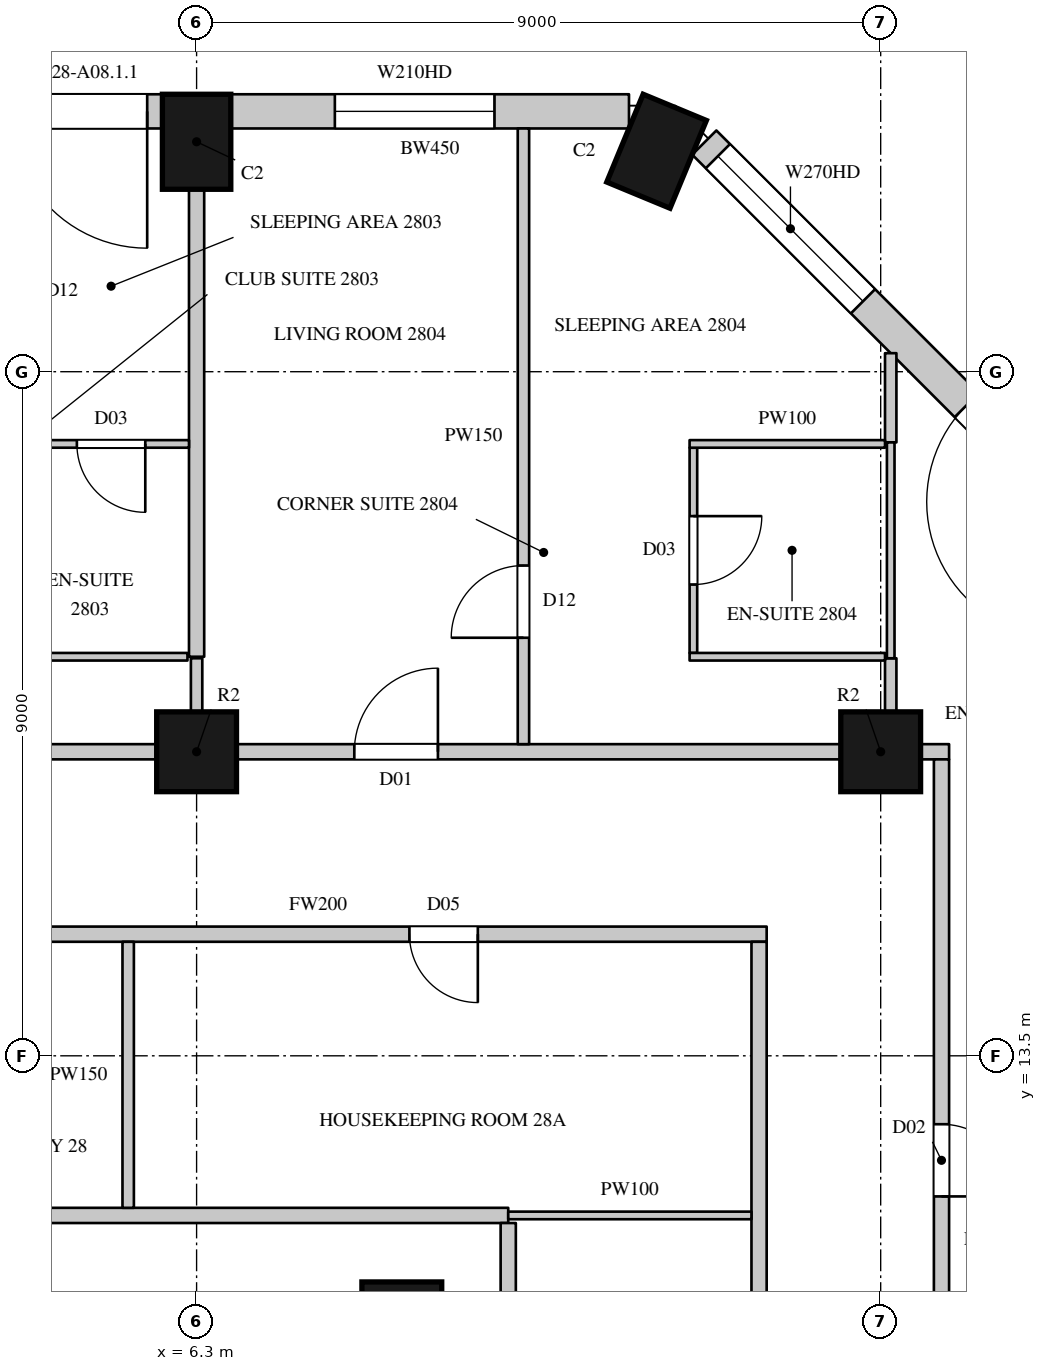
"""IFC4 building model, lengths in metres.
Left out: names, types, materials, properties, quantities, classifications, styles, units other than length and angle.
Written with IfcOpenShell. Run it as: python <this file> out.ifc"""

import sys

from ifc_helpers import new_model, si_unit, direction, frame, frame_2d, origin, origin_2d, place, context, subcontext, project, spatial, rectangle, circle, extrude, element, fill, save


model = new_model("IFC4")
c1 = context("Model", 3, precision=1e-05, world=origin(), true_north=direction((0.0, 1.0)))
c2 = subcontext(c1, "Body", "Model", "MODEL_VIEW")
j1 = project(units=[si_unit("LENGTHUNIT", "METRE"), si_unit("PLANEANGLEUNIT", "RADIAN")], contexts=[c1])
p1 = place(None, origin())
s1 = spatial("IfcSite", under=j1, at=p1, CompositionType="ELEMENT")
p2 = place(p1, origin())
s2 = spatial("IfcBuilding", under=s1, at=p2, CompositionType="ELEMENT")
p3 = place(p2, frame((0.0, 0.0, 131.1)))
s3 = spatial("IfcBuildingStorey", under=s2, at=p3, CompositionType="ELEMENT", Elevation=131.1)
for number, where, z_axis, x_axis in (
    (1, (12.352, 25.4, 0.0), (0.0, 0.0, 1.0), (-0.924, 0.383, 0.0)),
    (2, (6.3, 25.525, 0.0), (0.0, 0.0, 1.0), (-1.0, 0.0, 0.0)),
):
    element("IfcColumn", number, at=place(p3, frame(where, z_axis=z_axis, x_axis=x_axis)), inside=s3, PredefinedType="COLUMN", context=c2, shape_type="SweptSolid", body=[
        extrude(rectangle(XDim=0.9, YDim=1.25, at=origin_2d()), origin(), (0.0, 0.0, 1.0), 3.6),
    ])
for number, where, z_axis, x_axis in (
    (3, (6.3, 17.5, 0.0), (0.0, 0.0, 1.0), (1.0, 0.0, 0.0)),
    (4, (15.3, 17.5, 0.0), (0.0, 0.0, 1.0), (1.0, 0.0, 0.0)),
    (5, (9.0, 10.0, 0.0), (0.0, 0.0, 1.0), (1.0, 0.0, 0.0)),
):
    element("IfcColumn", number, at=place(p3, frame(where, z_axis=z_axis, x_axis=x_axis)), inside=s3, PredefinedType="COLUMN", context=c2, shape_type="SweptSolid", body=[
        extrude(circle(Radius=0.525, at=origin_2d()), origin(), (0.0, 0.0, 1.0), 3.6),
    ])
p4 = place(p3, frame((18.229, 20.265, 0.0), z_axis=(0.0, 0.0, 1.0), x_axis=(-0.707106781187, 0.707106781187, 0.0)))
e6 = element("IfcWall", 6, at=p4, inside=s3, PredefinedType="SOLIDWALL", context=c2, shape_type="SweptSolid", body=[
    extrude(rectangle(XDim=7.424, YDim=0.45, at=frame_2d((3.712, 0.0))), origin(), (0.0, 0.0, 1.0), 3.3),
])
p5 = place(p4, frame((0.74, 0.0, 0.0)))
e7 = element("IfcOpeningElement", 7, at=p5, cuts=e6, PredefinedType="OPENING", context=c2, shape_type="SweptSolid", body=[
    extrude(rectangle(XDim=1.8, YDim=2.4, at=frame_2d((0.9, 1.2))), frame((0.0, 0.235, 0.0), z_axis=(0.0, -1.0, 0.0), x_axis=(1.0, 0.0, 0.0)), (0.0, 0.0, 1.0), 0.47),
])
p6 = place(p4, frame((4.471, 0.0, 1.05)))
e8 = element("IfcOpeningElement", 8, at=p6, cuts=e6, PredefinedType="OPENING", context=c2, shape_type="SweptSolid", body=[
    extrude(rectangle(XDim=2.7, YDim=2.0, at=frame_2d((1.35, 1.0))), frame((0.0, 0.235, 0.0), z_axis=(0.0, -1.0, 0.0), x_axis=(1.0, 0.0, 0.0)), (0.0, 0.0, 1.0), 0.47),
])
p7 = place(p3, frame((11.989, 25.925, 0.0), z_axis=(0.0, 0.0, 1.0), x_axis=(-1.0, 0.0, 0.0)))
e9 = element("IfcWall", 9, at=p7, inside=s3, PredefinedType="SOLIDWALL", context=c2, shape_type="SweptSolid", body=[
    extrude(rectangle(XDim=5.239, YDim=0.45, at=frame_2d((2.619, 0.0))), origin(), (0.0, 0.0, 1.0), 3.3),
])
p8 = place(p7, frame((1.77, 0.0, 1.05)))
e10 = element("IfcOpeningElement", 10, at=p8, cuts=e9, PredefinedType="OPENING", context=c2, shape_type="SweptSolid", body=[
    extrude(rectangle(XDim=2.1, YDim=2.0, at=frame_2d((1.05, 1.0))), frame((0.0, 0.235, 0.0), z_axis=(0.0, -1.0, 0.0), x_axis=(1.0, 0.0, 0.0)), (0.0, 0.0, 1.0), 0.47),
])
p9 = place(p3, frame((5.85, 25.925, 0.0), z_axis=(0.0, 0.0, 1.0), x_axis=(-1.0, 0.0, 0.0)))
e11 = element("IfcWall", 11, at=p9, inside=s3, PredefinedType="SOLIDWALL", context=c2, shape_type="SweptSolid", body=[
    extrude(rectangle(XDim=8.1, YDim=0.45, at=frame_2d((4.05, 0.0))), origin(), (0.0, 0.0, 1.0), 3.3),
])
p10 = place(p9, frame((0.2, 0.0, 0.0)))
e12 = element("IfcOpeningElement", 12, at=p10, cuts=e11, PredefinedType="OPENING", context=c2, shape_type="SweptSolid", body=[
    extrude(rectangle(XDim=1.8, YDim=2.4, at=frame_2d((0.9, 1.2))), frame((0.0, 0.235, 0.0), z_axis=(0.0, -1.0, 0.0), x_axis=(1.0, 0.0, 0.0)), (0.0, 0.0, 1.0), 0.47),
])
p11 = place(p9, frame((2.2, 0.0, 1.05)))
e13 = element("IfcOpeningElement", 13, at=p11, cuts=e11, PredefinedType="OPENING", context=c2, shape_type="SweptSolid", body=[
    extrude(rectangle(XDim=1.2, YDim=2.0, at=frame_2d((0.6, 1.0))), frame((0.0, 0.235, 0.0), z_axis=(0.0, -1.0, 0.0), x_axis=(1.0, 0.0, 0.0)), (0.0, 0.0, 1.0), 0.47),
])
p12 = place(p9, frame((4.7, 0.0, 0.0)))
e14 = element("IfcOpeningElement", 14, at=p12, cuts=e11, PredefinedType="OPENING", context=c2, shape_type="SweptSolid", body=[
    extrude(rectangle(XDim=1.8, YDim=2.4, at=frame_2d((0.9, 1.2))), frame((0.0, 0.235, 0.0), z_axis=(0.0, -1.0, 0.0), x_axis=(1.0, 0.0, 0.0)), (0.0, 0.0, 1.0), 0.47),
])
p13 = place(p9, frame((6.7, 0.0, 1.05)))
e15 = element("IfcOpeningElement", 15, at=p13, cuts=e11, PredefinedType="OPENING", context=c2, shape_type="SweptSolid", body=[
    extrude(rectangle(XDim=1.2, YDim=2.0, at=frame_2d((0.6, 1.0))), frame((0.0, 0.235, 0.0), z_axis=(0.0, -1.0, 0.0), x_axis=(1.0, 0.0, 0.0)), (0.0, 0.0, 1.0), 0.47),
])
p14 = place(p3, frame((16.486, 23.529, 0.0), z_axis=(0.0, 0.0, 1.0), x_axis=(-0.707022305137, 0.707191247145, 0.0)))
e16 = element("IfcWall", 16, at=p14, inside=s3, PredefinedType="SOLIDWALL", context=c2, shape_type="SweptSolid", body=[
    extrude(rectangle(XDim=1.445, YDim=0.45, at=frame_2d((0.723, 0.0))), origin(), (0.0, 0.0, 1.0), 0.6),
])
p15 = place(p3, frame((-2.175, 17.5, 0.0), z_axis=(0.0, 0.0, 1.0), x_axis=(1.0, 0.0, 0.0)))
e17 = element("IfcWall", 17, at=p15, inside=s3, PredefinedType="PARTITIONING", context=c2, shape_type="SweptSolid", body=[
    extrude(rectangle(XDim=7.95, YDim=0.2, at=frame_2d((3.975, 0.0))), origin(), (0.0, 0.0, 1.0), 2.75),
])
p16 = place(p15, frame((4.55, 0.0, 0.0)))
e18 = element("IfcOpeningElement", 18, at=p16, cuts=e17, PredefinedType="OPENING", context=c2, shape_type="SweptSolid", body=[
    extrude(rectangle(XDim=1.1, YDim=2.4, at=frame_2d((0.55, 1.2))), frame((0.0, 0.11, 0.0), z_axis=(0.0, -1.0, 0.0), x_axis=(1.0, 0.0, 0.0)), (0.0, 0.0, 1.0), 0.22),
])
p17 = place(p3, frame((6.825, 17.5, 0.0), z_axis=(0.0, 0.0, 1.0), x_axis=(1.0, 0.0, 0.0)))
e19 = element("IfcWall", 19, at=p17, inside=s3, PredefinedType="PARTITIONING", context=c2, shape_type="SweptSolid", body=[
    extrude(rectangle(XDim=7.95, YDim=0.2, at=frame_2d((3.975, 0.0))), origin(), (0.0, 0.0, 1.0), 2.75),
])
p18 = place(p17, frame((1.55, 0.0, 0.0)))
e20 = element("IfcOpeningElement", 20, at=p18, cuts=e19, PredefinedType="OPENING", context=c2, shape_type="SweptSolid", body=[
    extrude(rectangle(XDim=1.1, YDim=2.4, at=frame_2d((0.55, 1.2))), frame((0.0, 0.11, 0.0), z_axis=(0.0, -1.0, 0.0), x_axis=(1.0, 0.0, 0.0)), (0.0, 0.0, 1.0), 0.22),
])
p19 = place(p3, frame((15.825, 17.5, 0.0), z_axis=(0.0, 0.0, 1.0), x_axis=(1.0, 0.0, 0.0)))
e21 = element("IfcWall", 21, at=p19, inside=s3, PredefinedType="PARTITIONING", context=c2, shape_type="SweptSolid", body=[
    extrude(rectangle(XDim=0.375, YDim=0.2, at=frame_2d((0.188, 0.0))), origin(), (0.0, 0.0, 1.0), 3.3),
])
p20 = place(p3, frame((-8.3, 11.4, 0.0), z_axis=(0.0, 0.0, 1.0), x_axis=(1.0, 0.0, 0.0)))
e22 = element("IfcWall", 22, at=p20, inside=s3, PredefinedType="PARTITIONING", context=c2, shape_type="SweptSolid", body=[
    extrude(rectangle(XDim=18.7, YDim=0.2, at=frame_2d((9.35, 0.0))), origin(), (0.0, 0.0, 1.0), 3.3),
])
p21 = place(p20, frame((6.9, 0.0, 0.0)))
e23 = element("IfcOpeningElement", 23, at=p21, cuts=e22, PredefinedType="OPENING", context=c2, shape_type="SweptSolid", body=[
    extrude(rectangle(XDim=1.5, YDim=2.2, at=frame_2d((0.75, 1.1))), frame((0.0, 0.11, 0.0), z_axis=(0.0, -1.0, 0.0), x_axis=(1.0, 0.0, 0.0)), (0.0, 0.0, 1.0), 0.22),
])
p22 = place(p3, frame((2.0, 15.1, 0.0), z_axis=(0.0, 0.0, 1.0), x_axis=(1.0, 0.0, 0.0)))
e24 = element("IfcWall", 24, at=p22, inside=s3, PredefinedType="PARTITIONING", context=c2, shape_type="SweptSolid", body=[
    extrude(rectangle(XDim=11.8, YDim=0.2, at=frame_2d((5.9, 0.0))), origin(), (0.0, 0.0, 1.0), 3.3),
])
p23 = place(p22, frame((7.1, 0.0, 0.0)))
e25 = element("IfcOpeningElement", 25, at=p23, cuts=e24, PredefinedType="OPENING", context=c2, shape_type="SweptSolid", body=[
    extrude(rectangle(XDim=0.9, YDim=2.2, at=frame_2d((0.45, 1.1))), frame((0.0, 0.11, 0.0), z_axis=(0.0, -1.0, 0.0), x_axis=(1.0, 0.0, 0.0)), (0.0, 0.0, 1.0), 0.22),
])
p24 = place(p3, frame((10.4, -11.3, 0.0), z_axis=(0.0, 0.0, 1.0), x_axis=(0.0, 1.0, 0.0)))
e26 = element("IfcWall", 26, at=p24, inside=s3, PredefinedType="PARTITIONING", context=c2, shape_type="SweptSolid", body=[
    extrude(rectangle(XDim=22.6, YDim=0.2, at=frame_2d((11.3, 0.0))), origin(), (0.0, 0.0, 1.0), 3.3),
])
p25 = place(p24, frame((16.3, 0.0, 0.0)))
e27 = element("IfcOpeningElement", 27, at=p25, cuts=e26, PredefinedType="OPENING", context=c2, shape_type="SweptSolid", body=[
    extrude(rectangle(XDim=1.5, YDim=2.2, at=frame_2d((0.75, 1.1))), frame((0.0, 0.11, 0.0), z_axis=(0.0, -1.0, 0.0), x_axis=(1.0, 0.0, 0.0)), (0.0, 0.0, 1.0), 0.22),
])
p26 = place(p24, frame((9.15, 0.0, 0.0)))
e28 = element("IfcOpeningElement", 28, at=p26, cuts=e26, PredefinedType="OPENING", context=c2, shape_type="SweptSolid", body=[
    extrude(rectangle(XDim=1.5, YDim=2.2, at=frame_2d((0.75, 1.1))), frame((0.0, 0.11, 0.0), z_axis=(0.0, -1.0, 0.0), x_axis=(1.0, 0.0, 0.0)), (0.0, 0.0, 1.0), 0.22),
])
p27 = place(p3, frame((13.7, 6.825, 0.0), z_axis=(0.0, 0.0, 1.0), x_axis=(0.0, 1.0, 0.0)))
e29 = element("IfcWall", 29, at=p27, inside=s3, PredefinedType="PARTITIONING", context=c2, shape_type="SweptSolid", body=[
    extrude(rectangle(XDim=8.175, YDim=0.2, at=frame_2d((4.087, 0.0))), origin(), (0.0, 0.0, 1.0), 3.3),
])
p28 = place(p3, frame((16.1, 4.75, 0.0), z_axis=(0.0, 0.0, 1.0), x_axis=(0.0, 1.0, 0.0)))
e30 = element("IfcWall", 30, at=p28, inside=s3, PredefinedType="PARTITIONING", context=c2, shape_type="SweptSolid", body=[
    extrude(rectangle(XDim=12.65, YDim=0.2, at=frame_2d((6.325, 0.0))), origin(), (0.0, 0.0, 1.0), 3.3),
])
p29 = place(p28, frame((0.5, 0.0, 0.0)))
e31 = element("IfcOpeningElement", 31, at=p29, cuts=e30, PredefinedType="OPENING", context=c2, shape_type="SweptSolid", body=[
    extrude(rectangle(XDim=0.95, YDim=2.2, at=frame_2d((0.475, 1.1))), frame((0.0, 0.11, 0.0), z_axis=(0.0, -1.0, 0.0), x_axis=(1.0, 0.0, 0.0)), (0.0, 0.0, 1.0), 0.22),
])
p30 = place(p28, frame((6.9, 0.0, 0.0)))
e32 = element("IfcOpeningElement", 32, at=p30, cuts=e30, PredefinedType="OPENING", context=c2, shape_type="SweptSolid", body=[
    extrude(rectangle(XDim=0.95, YDim=2.2, at=frame_2d((0.475, 1.1))), frame((0.0, 0.11, 0.0), z_axis=(0.0, -1.0, 0.0), x_axis=(1.0, 0.0, 0.0)), (0.0, 0.0, 1.0), 0.22),
])
p31 = place(p3, frame((5.4, 11.5, 0.0), z_axis=(0.0, 0.0, 1.0), x_axis=(0.0, 1.0, 0.0)))
e33 = element("IfcWall", 33, at=p31, inside=s3, PredefinedType="PARTITIONING", context=c2, shape_type="SweptSolid", body=[
    extrude(rectangle(XDim=3.5, YDim=0.15, at=frame_2d((1.75, 0.0))), origin(), (0.0, 0.0, 1.0), 3.3),
])
p32 = place(p3, frame((6.3, 18.025, 0.0), z_axis=(0.0, 0.0, 1.0), x_axis=(0.0, 1.0, 0.0)))
e34 = element("IfcWall", 34, at=p32, inside=s3, PredefinedType="PARTITIONING", context=c2, shape_type="SweptSolid", body=[
    extrude(rectangle(XDim=0.705, YDim=0.15, at=frame_2d((0.353, 0.0))), origin(), (0.0, 0.0, 1.0), 2.75),
])
p33 = place(p3, frame((10.6, 17.6, 0.0), z_axis=(0.0, 0.0, 1.0), x_axis=(0.0, 1.0, 0.0)))
e35 = element("IfcWall", 35, at=p33, inside=s3, PredefinedType="PARTITIONING", context=c2, shape_type="SweptSolid", body=[
    extrude(rectangle(XDim=8.1, YDim=0.15, at=frame_2d((4.05, 0.0))), origin(), (0.0, 0.0, 1.0), 3.3),
])
p34 = place(p33, frame((1.4, 0.0, 0.0)))
e36 = element("IfcOpeningElement", 36, at=p34, cuts=e35, PredefinedType="OPENING", context=c2, shape_type="SweptSolid", body=[
    extrude(rectangle(XDim=0.95, YDim=2.2, at=frame_2d((0.475, 1.1))), frame((0.0, 0.085, 0.0), z_axis=(0.0, -1.0, 0.0), x_axis=(1.0, 0.0, 0.0)), (0.0, 0.0, 1.0), 0.17),
])
p35 = place(p3, frame((15.432, 18.016, 0.0), z_axis=(0.0, 0.0, 1.0), x_axis=(0.0, 1.0, 0.0)))
e37 = element("IfcWall", 37, at=p35, inside=s3, PredefinedType="PARTITIONING", context=c2, shape_type="SweptSolid", body=[
    extrude(rectangle(XDim=0.714, YDim=0.15, at=frame_2d((0.357, 0.0))), origin(), (0.0, 0.0, 1.0), 3.3),
])
p36 = place(p3, frame((15.432, 21.57, 0.0), z_axis=(0.0, 0.0, 1.0), x_axis=(0.0, 1.0, 0.0)))
e38 = element("IfcWall", 38, at=p36, inside=s3, PredefinedType="PARTITIONING", context=c2, shape_type="SweptSolid", body=[
    extrude(rectangle(XDim=1.174, YDim=0.15, at=frame_2d((0.587, 0.0))), origin(), (0.0, 0.0, 1.0), 3.3),
])
p37 = place(p3, frame((6.3, 18.75, 0.0), z_axis=(0.0, 0.0, 1.0), x_axis=(0.0, 1.0, 0.0)))
e39 = element("IfcWall", 39, at=p37, inside=s3, PredefinedType="PARTITIONING", context=c2, shape_type="SweptSolid", body=[
    extrude(rectangle(XDim=6.15, YDim=0.2, at=frame_2d((3.075, 0.0))), origin(), (0.0, 0.0, 1.0), 2.75),
])
p38 = place(p3, frame((4.125, 21.55, 0.0), z_axis=(0.0, 0.0, 1.0), x_axis=(1.0, 0.0, 0.0)))
e40 = element("IfcWall", 40, at=p38, inside=s3, PredefinedType="PARTITIONING", context=c2, shape_type="SweptSolid", body=[
    extrude(rectangle(XDim=2.075, YDim=0.1, at=frame_2d((1.038, 0.0))), origin(), (0.0, 0.0, 1.0), 3.3),
])
p39 = place(p38, frame((0.6, 0.0, 0.0)))
e41 = element("IfcOpeningElement", 41, at=p39, cuts=e40, PredefinedType="OPENING", context=c2, shape_type="SweptSolid", body=[
    extrude(rectangle(XDim=0.9, YDim=2.2, at=frame_2d((0.45, 1.1))), frame((0.0, 0.06, 0.0), z_axis=(0.0, -1.0, 0.0), x_axis=(1.0, 0.0, 0.0)), (0.0, 0.0, 1.0), 0.12),
])
p40 = place(p3, frame((4.07, 18.75, 0.0), z_axis=(0.0, 0.0, 1.0), x_axis=(1.0, 0.0, 0.0)))
e42 = element("IfcWall", 42, at=p40, inside=s3, PredefinedType="PARTITIONING", context=c2, shape_type="SweptSolid", body=[
    extrude(rectangle(XDim=2.11, YDim=0.1, at=frame_2d((1.055, 0.0))), origin(), (0.0, 0.0, 1.0), 3.3),
])
p41 = place(p3, frame((10.4, 11.4, 0.0), z_axis=(0.0, 0.0, 1.0), x_axis=(1.0, 0.0, 0.0)))
e43 = element("IfcWall", 43, at=p41, inside=s3, PredefinedType="PARTITIONING", context=c2, shape_type="SweptSolid", body=[
    extrude(rectangle(XDim=3.2, YDim=0.1, at=frame_2d((1.6, 0.0))), origin(), (0.0, 0.0, 1.0), 3.3),
])
p42 = place(p3, frame((12.836, 18.8, 0.0), z_axis=(0.0, 0.0, 1.0), x_axis=(0.0, 1.0, 0.0)))
e44 = element("IfcWall", 44, at=p42, inside=s3, PredefinedType="PARTITIONING", context=c2, shape_type="SweptSolid", body=[
    extrude(rectangle(XDim=2.7, YDim=0.1, at=frame_2d((1.35, 0.0))), origin(), (0.0, 0.0, 1.0), 3.3),
])
p43 = place(p42, frame((0.9, 0.0, 0.0)))
e45 = element("IfcOpeningElement", 45, at=p43, cuts=e44, PredefinedType="OPENING", context=c2, shape_type="SweptSolid", body=[
    extrude(rectangle(XDim=0.9, YDim=2.2, at=frame_2d((0.45, 1.1))), frame((0.0, 0.06, 0.0), z_axis=(0.0, -1.0, 0.0), x_axis=(1.0, 0.0, 0.0)), (0.0, 0.0, 1.0), 0.12),
])
for number, where, z_axis, x_axis in (
    (46, (12.786, 18.75, 0.0), (0.0, 0.0, 1.0), (1.0, 0.0, 0.0)),
    (47, (12.786, 21.55, 0.0), (0.0, 0.0, 1.0), (1.0, 0.0, 0.0)),
):
    element("IfcWall", number, at=place(p3, frame(where, z_axis=z_axis, x_axis=x_axis)), inside=s3, PredefinedType="PARTITIONING", context=c2, shape_type="SweptSolid", body=[
        extrude(rectangle(XDim=2.571, YDim=0.1, at=frame_2d((1.286, 0.0))), origin(), (0.0, 0.0, 1.0), 3.3),
    ])
p44 = place(p3, frame((15.432, 18.73, 0.0), z_axis=(0.0, 0.0, 1.0), x_axis=(0.0, 1.0, 0.0)))
e48 = element("IfcWall", 48, at=p44, inside=s3, PredefinedType="PARTITIONING", context=c2, shape_type="SweptSolid", body=[
    extrude(rectangle(XDim=2.84, YDim=0.1, at=frame_2d((1.42, 0.0))), origin(), (0.0, 0.0, 1.0), 3.3),
])
p45 = place(p5, origin())
e49 = element("IfcDoor", 49, at=p45, inside=s3, OperationType="SLIDING_TO_LEFT", PredefinedType="DOOR", context=c2, shape_type="SweptSolid", body=[
    extrude(rectangle(XDim=1.8, YDim=2.4, at=frame_2d((0.9, 1.2))), frame((0.0, 0.13, 0.0), z_axis=(0.0, -1.0, 0.0), x_axis=(1.0, 0.0, 0.0)), (0.0, 0.0, 1.0), 0.05),
])
fill(e7, e49)
p46 = place(p6, origin())
e50 = element("IfcWindow", 50, at=p46, inside=s3, PartitioningType="SINGLE_PANEL", PredefinedType="WINDOW", context=c2, shape_type="SweptSolid", body=[
    extrude(rectangle(XDim=2.7, YDim=2.0, at=frame_2d((1.35, 1.0))), frame((0.0, 0.135, 0.0), z_axis=(0.0, -1.0, 0.0), x_axis=(1.0, 0.0, 0.0)), (0.0, 0.0, 1.0), 0.06),
])
fill(e8, e50)
p47 = place(p10, origin())
e51 = element("IfcDoor", 51, at=p47, inside=s3, OperationType="SLIDING_TO_LEFT", PredefinedType="DOOR", context=c2, shape_type="SweptSolid", body=[
    extrude(rectangle(XDim=1.8, YDim=2.4, at=frame_2d((0.9, 1.2))), frame((0.0, 0.13, 0.0), z_axis=(0.0, -1.0, 0.0), x_axis=(1.0, 0.0, 0.0)), (0.0, 0.0, 1.0), 0.05),
])
fill(e12, e51)
p48 = place(p23, origin())
e52 = element("IfcDoor", 52, at=p48, inside=s3, OperationType="SINGLE_SWING_LEFT", PredefinedType="DOOR", context=c2, shape_type="SweptSolid", body=[
    extrude(rectangle(XDim=0.9, YDim=2.2, at=frame_2d((0.45, 1.1))), frame((0.0, 0.025, 0.0), z_axis=(0.0, -1.0, 0.0), x_axis=(1.0, 0.0, 0.0)), (0.0, 0.0, 1.0), 0.05),
])
fill(e25, e52)
p49 = place(p39, origin())
e53 = element("IfcDoor", 53, at=p49, inside=s3, OperationType="SINGLE_SWING_LEFT", PredefinedType="DOOR", context=c2, shape_type="SweptSolid", body=[
    extrude(rectangle(XDim=0.9, YDim=2.2, at=frame_2d((0.45, 1.1))), frame((0.0, 0.025, 0.0), z_axis=(0.0, -1.0, 0.0), x_axis=(1.0, 0.0, 0.0)), (0.0, 0.0, 1.0), 0.05),
])
fill(e41, e53)
p50 = place(p18, origin())
e54 = element("IfcDoor", 54, at=p50, inside=s3, OperationType="SINGLE_SWING_RIGHT", PredefinedType="DOOR", context=c2, shape_type="SweptSolid", body=[
    extrude(rectangle(XDim=1.1, YDim=2.4, at=frame_2d((0.55, 1.2))), frame((0.0, 0.025, 0.0), z_axis=(0.0, -1.0, 0.0), x_axis=(1.0, 0.0, 0.0)), (0.0, 0.0, 1.0), 0.05),
])
fill(e20, e54)
p51 = place(p34, origin())
e55 = element("IfcDoor", 55, at=p51, inside=s3, OperationType="SINGLE_SWING_LEFT", PredefinedType="DOOR", context=c2, shape_type="SweptSolid", body=[
    extrude(rectangle(XDim=0.95, YDim=2.2, at=frame_2d((0.475, 1.1))), frame((0.0, 0.025, 0.0), z_axis=(0.0, -1.0, 0.0), x_axis=(1.0, 0.0, 0.0)), (0.0, 0.0, 1.0), 0.05),
])
fill(e36, e55)
p52 = place(p43, origin())
e56 = element("IfcDoor", 56, at=p52, inside=s3, OperationType="SINGLE_SWING_LEFT", PredefinedType="DOOR", context=c2, shape_type="SweptSolid", body=[
    extrude(rectangle(XDim=0.9, YDim=2.2, at=frame_2d((0.45, 1.1))), frame((0.0, 0.025, 0.0), z_axis=(0.0, -1.0, 0.0), x_axis=(1.0, 0.0, 0.0)), (0.0, 0.0, 1.0), 0.05),
])
fill(e45, e56)
p53 = place(p30, origin())
e57 = element("IfcDoor", 57, at=p53, inside=s3, OperationType="SINGLE_SWING_RIGHT", PredefinedType="DOOR", context=c2, shape_type="SweptSolid", body=[
    extrude(rectangle(XDim=0.95, YDim=2.2, at=frame_2d((0.475, 1.1))), frame((0.0, 0.025, 0.0), z_axis=(0.0, -1.0, 0.0), x_axis=(1.0, 0.0, 0.0)), (0.0, 0.0, 1.0), 0.05),
])
fill(e32, e57)
p54 = place(p8, origin())
e58 = element("IfcWindow", 58, at=p54, inside=s3, PartitioningType="SINGLE_PANEL", PredefinedType="WINDOW", context=c2, shape_type="SweptSolid", body=[
    extrude(rectangle(XDim=2.1, YDim=2.0, at=frame_2d((1.05, 1.0))), frame((0.0, 0.135, 0.0), z_axis=(0.0, -1.0, 0.0), x_axis=(1.0, 0.0, 0.0)), (0.0, 0.0, 1.0), 0.06),
])
fill(e10, e58)
save(model, sys.argv[1])
